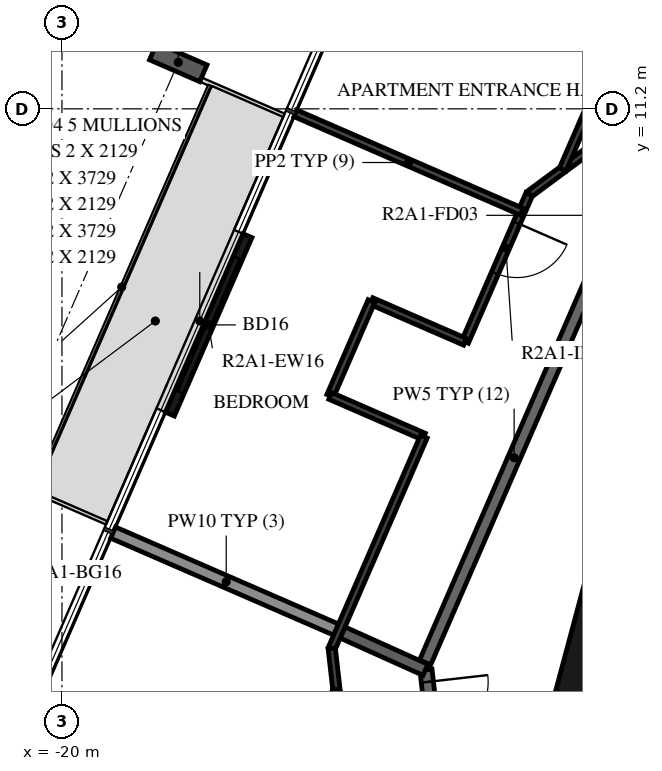
"""IFC4 building model, lengths in metres.
Left out: names, types, materials, properties, quantities, classifications, styles, units other than length and angle.
Written with IfcOpenShell. Run it as: python <this file> out.ifc"""

import sys

from ifc_helpers import new_model, si_unit, direction, frame, frame_2d, origin, origin_2d, place, context, subcontext, project, spatial, rectangle, i_section, extrude, element, fill, save


model = new_model("IFC4")
c1 = context("Model", 3, precision=1e-05, world=origin(), true_north=direction((0.0, 1.0)))
c2 = subcontext(c1, "Body", "Model", "MODEL_VIEW")
j1 = project(units=[si_unit("LENGTHUNIT", "METRE"), si_unit("PLANEANGLEUNIT", "RADIAN")], contexts=[c1])
p1 = place(None, origin())
s1 = spatial("IfcSite", under=j1, at=p1, CompositionType="ELEMENT")
p2 = place(p1, origin())
s2 = spatial("IfcBuilding", under=s1, at=p2, CompositionType="ELEMENT")
p3 = place(p2, frame((0.0, 0.0, 80.2)))
s3 = spatial("IfcBuildingStorey", under=s2, at=p3, CompositionType="ELEMENT", Elevation=80.2)
p4 = place(p3, frame((-18.087, 11.964, -0.38), z_axis=(0.0, 0.0, 1.0), x_axis=(0.398749038162, 0.917060087761, 0.0)))
e1 = element("IfcColumn", 1, at=p4, inside=s3, PredefinedType="COLUMN", context=c2, shape_type="SweptSolid", body=[
    extrude(i_section(OverallWidth=0.3, OverallDepth=0.9, WebThickness=0.019, FlangeThickness=0.035, FilletRadius=0.03, at=origin_2d()), origin(), (0.0, 0.0, 1.0), 3.5),
])
p5 = place(p3, frame((-16.949, 9.114, 0.0), z_axis=(0.0, 0.0, 1.0), x_axis=(-0.398720531764, -0.917072482168, 0.0)))
e2 = element("IfcWall", 2, at=p5, inside=s3, PredefinedType="STANDARD", context=c2, shape_type="SweptSolid", body=[
    extrude(rectangle(XDim=3.2, YDim=0.16, at=frame_2d((1.6, 0.0))), origin(), (0.0, 0.0, 1.0), 3.12),
])
p6 = place(p5, frame((0.4, 0.0, 0.0)))
e3 = element("IfcOpeningElement", 3, at=p6, cuts=e2, PredefinedType="OPENING", context=c2, shape_type="SweptSolid", body=[
    extrude(rectangle(XDim=2.4, YDim=2.4, at=frame_2d((1.2, 1.2))), frame((0.0, 0.09, 0.0), z_axis=(0.0, -1.0, 0.0), x_axis=(1.0, 0.0, 0.0)), (0.0, 0.0, 1.0), 0.18),
])
p7 = place(p3, frame((-10.858, 4.479, 0.0), z_axis=(0.0, 0.0, 1.0), x_axis=(-0.258734743916, -0.965948410781, 0.0)))
e4 = element("IfcWall", 4, at=p7, inside=s3, PredefinedType="SHEAR", context=c2, shape_type="SweptSolid", body=[
    extrude(rectangle(XDim=3.033, YDim=0.5, at=frame_2d((1.516, 0.0))), origin(), (0.0, 0.0, 1.0), 3.12),
])
p8 = place(p3, frame((-11.1, 8.829, 0.0), z_axis=(0.0, 0.0, 1.0), x_axis=(-0.398741918631, -0.917063183388, 0.0)))
e5 = element("IfcWall", 5, at=p8, inside=s3, PredefinedType="STANDARD", context=c2, shape_type="SweptSolid", body=[
    extrude(rectangle(XDim=7.342, YDim=0.2, at=frame_2d((3.671, 0.0))), origin(), (0.0, 0.0, 1.0), 3.12),
])
p9 = place(p3, frame((-14.013, 1.974, 0.0), z_axis=(0.0, 0.0, 1.0), x_axis=(0.113196526349, -0.993572617589, 0.0)))
e6 = element("IfcWall", 6, at=p9, inside=s3, PredefinedType="STANDARD", context=c2, shape_type="SweptSolid", body=[
    extrude(rectangle(XDim=7.219, YDim=0.2, at=frame_2d((3.609, 0.0))), origin(), (0.0, 0.0, 1.0), 3.12),
])
p10 = place(p9, frame((0.2, 0.0, 0.0)))
e7 = element("IfcOpeningElement", 7, at=p10, cuts=e6, PredefinedType="OPENING", context=c2, shape_type="SweptSolid", body=[
    extrude(rectangle(XDim=1.0, YDim=2.1, at=frame_2d((0.5, 1.05))), frame((0.0, 0.11, 0.0), z_axis=(0.0, -1.0, 0.0), x_axis=(1.0, 0.0, 0.0)), (0.0, 0.0, 1.0), 0.22),
])
p11 = place(p3, frame((-15.439, 2.613, 0.0), z_axis=(0.0, 0.0, 1.0), x_axis=(0.911830308819, -0.410567275752, 0.0)))
e8 = element("IfcWall", 8, at=p11, inside=s3, PredefinedType="STANDARD", context=c2, shape_type="SweptSolid", body=[
    extrude(rectangle(XDim=1.553, YDim=0.2, at=frame_2d((0.777, 0.0))), origin(), (0.0, 0.0, 1.0), 3.12),
])
p12 = place(p3, frame((-19.159, 4.231, 0.0), z_axis=(0.0, 0.0, 1.0), x_axis=(0.91704996524, -0.398772317562, 0.0)))
e9 = element("IfcWall", 9, at=p12, inside=s3, PredefinedType="STANDARD", context=c2, shape_type="SweptSolid", body=[
    extrude(rectangle(XDim=4.057, YDim=0.2, at=frame_2d((2.029, 0.0))), origin(), (0.0, 0.0, 1.0), 2.73),
])
p13 = place(p3, frame((-5.767, 14.641, 0.0), z_axis=(0.0, 0.0, 1.0), x_axis=(-0.803853364238, -0.594827511807, 0.0)))
e10 = element("IfcWall", 10, at=p13, inside=s3, PredefinedType="PARTITIONING", context=c2, shape_type="SweptSolid", body=[
    extrude(rectangle(XDim=8.146, YDim=0.12, at=frame_2d((4.073, 0.0))), origin(), (0.0, 0.0, 1.0), 3.12),
])
p14 = place(p13, frame((0.97, 0.0, 0.0)))
e11 = element("IfcOpeningElement", 11, at=p14, cuts=e10, PredefinedType="OPENING", context=c2, shape_type="SweptSolid", body=[
    extrude(rectangle(XDim=0.8, YDim=2.1, at=frame_2d((0.4, 1.05))), frame((0.0, 0.07, 0.0), z_axis=(0.0, -1.0, 0.0), x_axis=(1.0, 0.0, 0.0)), (0.0, 0.0, 1.0), 0.14),
])
p15 = place(p3, frame((-12.315, 9.796, 0.0), z_axis=(0.0, 0.0, 1.0), x_axis=(-0.398790200406, -0.917042188812, 0.0)))
e12 = element("IfcWall", 12, at=p15, inside=s3, PredefinedType="PARTITIONING", context=c2, shape_type="SweptSolid", body=[
    extrude(rectangle(XDim=2.646, YDim=0.12, at=frame_2d((1.323, 0.0))), origin(), (0.0, 0.0, 1.0), 3.12),
])
p16 = place(p15, frame((0.513, 0.0, 0.0)))
e13 = element("IfcOpeningElement", 13, at=p16, cuts=e12, PredefinedType="OPENING", context=c2, shape_type="SweptSolid", body=[
    extrude(rectangle(XDim=0.9, YDim=2.1, at=frame_2d((0.45, 1.05))), frame((0.0, 0.07, 0.0), z_axis=(0.0, -1.0, 0.0), x_axis=(1.0, 0.0, 0.0)), (0.0, 0.0, 1.0), 0.14),
])
p17 = place(p3, frame((-13.371, 7.369, 0.0), z_axis=(0.0, 0.0, 1.0), x_axis=(-0.917109358393, 0.398635704306, 0.0)))
e14 = element("IfcWall", 14, at=p17, inside=s3, PredefinedType="PARTITIONING", context=c2, shape_type="SweptSolid", body=[
    extrude(rectangle(XDim=1.679, YDim=0.12, at=frame_2d((0.839, 0.0))), origin(), (0.0, 0.0, 1.0), 3.12),
])
p18 = place(p3, frame((-14.91, 8.038, 0.0), z_axis=(0.0, 0.0, 1.0), x_axis=(-0.398715607479, -0.91707462311, 0.0)))
e15 = element("IfcWall", 15, at=p18, inside=s3, PredefinedType="PARTITIONING", context=c2, shape_type="SweptSolid", body=[
    extrude(rectangle(XDim=1.7, YDim=0.12, at=frame_2d((0.85, 0.0))), origin(), (0.0, 0.0, 1.0), 3.12),
])
p19 = place(p3, frame((-15.588, 6.479, 0.0), z_axis=(0.0, 0.0, 1.0), x_axis=(0.917033055073, -0.398811203332, 0.0)))
e16 = element("IfcWall", 16, at=p19, inside=s3, PredefinedType="PARTITIONING", context=c2, shape_type="SweptSolid", body=[
    extrude(rectangle(XDim=1.678, YDim=0.12, at=frame_2d((0.839, 0.0))), origin(), (0.0, 0.0, 1.0), 3.12),
])
p20 = place(p3, frame((-14.049, 5.81, 0.0), z_axis=(0.0, 0.0, 1.0), x_axis=(-0.398707311688, -0.917078229818, 0.0)))
e17 = element("IfcWall", 17, at=p20, inside=s3, PredefinedType="PARTITIONING", context=c2, shape_type="SweptSolid", body=[
    extrude(rectangle(XDim=3.799, YDim=0.12, at=frame_2d((1.899, 0.0))), origin(), (0.0, 0.0, 1.0), 3.12),
])
p21 = place(p3, frame((-5.952, 23.571, 0.0), z_axis=(0.0, 0.0, 1.0), x_axis=(-0.398745097158, -0.917061801348, 0.0)))
e18 = element("IfcWall", 18, at=p21, inside=s3, PredefinedType="PARTITIONING", context=c2, shape_type="SweptSolid", body=[
    extrude(rectangle(XDim=14.576, YDim=0.12, at=frame_2d((7.288, 0.0))), origin(), (0.0, 0.0, 1.0), 3.12),
])
p22 = place(p21, frame((2.801, 0.0, 0.0)))
e19 = element("IfcOpeningElement", 19, at=p22, cuts=e18, PredefinedType="OPENING", context=c2, shape_type="SweptSolid", body=[
    extrude(rectangle(XDim=0.9, YDim=2.1, at=frame_2d((0.45, 1.05))), frame((0.0, 0.07, 0.0), z_axis=(0.0, -1.0, 0.0), x_axis=(1.0, 0.0, 0.0)), (0.0, 0.0, 1.0), 0.14),
])
p23 = place(p21, frame((1.405, 0.0, 0.0)))
e20 = element("IfcOpeningElement", 20, at=p23, cuts=e18, PredefinedType="OPENING", context=c2, shape_type="SweptSolid", body=[
    extrude(rectangle(XDim=0.9, YDim=2.1, at=frame_2d((0.45, 1.05))), frame((0.0, 0.07, 0.0), z_axis=(0.0, -1.0, 0.0), x_axis=(1.0, 0.0, 0.0)), (0.0, 0.0, 1.0), 0.14),
])
p24 = place(p3, frame((-16.161, 11.126, 0.0), z_axis=(0.0, 0.0, 1.0), x_axis=(0.91705953326, -0.398750313425, 0.0)))
e21 = element("IfcWall", 21, at=p24, inside=s3, PredefinedType="PARTITIONING", context=c2, shape_type="SweptSolid", body=[
    extrude(rectangle(XDim=4.057, YDim=0.12, at=frame_2d((2.029, 0.0))), origin(), (0.0, 0.0, 1.0), 2.73),
])
p25 = place(p3, frame((-15.563, 2.326, 0.0), z_axis=(0.0, 0.0, 1.0), x_axis=(0.113013677091, -0.993593432341, 0.0)))
e22 = element("IfcWall", 22, at=p25, inside=s3, PredefinedType="PARTITIONING", context=c2, shape_type="SweptSolid", body=[
    extrude(rectangle(XDim=0.685, YDim=0.12, at=frame_2d((0.342, 0.0))), origin(), (0.0, 0.0, 1.0), 3.12),
])
p26 = place(p3, frame((-15.486, 1.646, 0.0), z_axis=(0.0, 0.0, 1.0), x_axis=(-0.398701933952, -0.917080567814, 0.0)))
e23 = element("IfcWall", 23, at=p26, inside=s3, PredefinedType="PARTITIONING", context=c2, shape_type="SweptSolid", body=[
    extrude(rectangle(XDim=0.739, YDim=0.12, at=frame_2d((0.369, 0.0))), origin(), (0.0, 0.0, 1.0), 3.12),
])
p27 = place(p6, origin())
e24 = element("IfcDoor", 24, at=p27, inside=s3, OperationType="DOUBLE_DOOR_SLIDING", PredefinedType="DOOR", context=c2, shape_type="SweptSolid", body=[
    extrude(rectangle(XDim=2.4, YDim=2.4, at=frame_2d((1.2, 1.2))), frame((0.0, 0.025, 0.0), z_axis=(0.0, -1.0, 0.0), x_axis=(1.0, 0.0, 0.0)), (0.0, 0.0, 1.0), 0.05),
])
fill(e3, e24)
p28 = place(p16, origin())
e25 = element("IfcDoor", 25, at=p28, inside=s3, OperationType="SINGLE_SWING_LEFT", PredefinedType="DOOR", context=c2, shape_type="SweptSolid", body=[
    extrude(rectangle(XDim=0.9, YDim=2.1, at=frame_2d((0.45, 1.05))), frame((0.0, 0.025, 0.0), z_axis=(0.0, -1.0, 0.0), x_axis=(1.0, 0.0, 0.0)), (0.0, 0.0, 1.0), 0.05),
])
fill(e13, e25)
p29 = place(p10, origin())
e26 = element("IfcDoor", 26, at=p29, inside=s3, OperationType="SINGLE_SWING_RIGHT", PredefinedType="DOOR", context=c2, shape_type="SweptSolid", body=[
    extrude(rectangle(XDim=1.0, YDim=2.1, at=frame_2d((0.5, 1.05))), frame((0.0, 0.025, 0.0), z_axis=(0.0, -1.0, 0.0), x_axis=(1.0, 0.0, 0.0)), (0.0, 0.0, 1.0), 0.05),
])
fill(e7, e26)
save(model, sys.argv[1])
